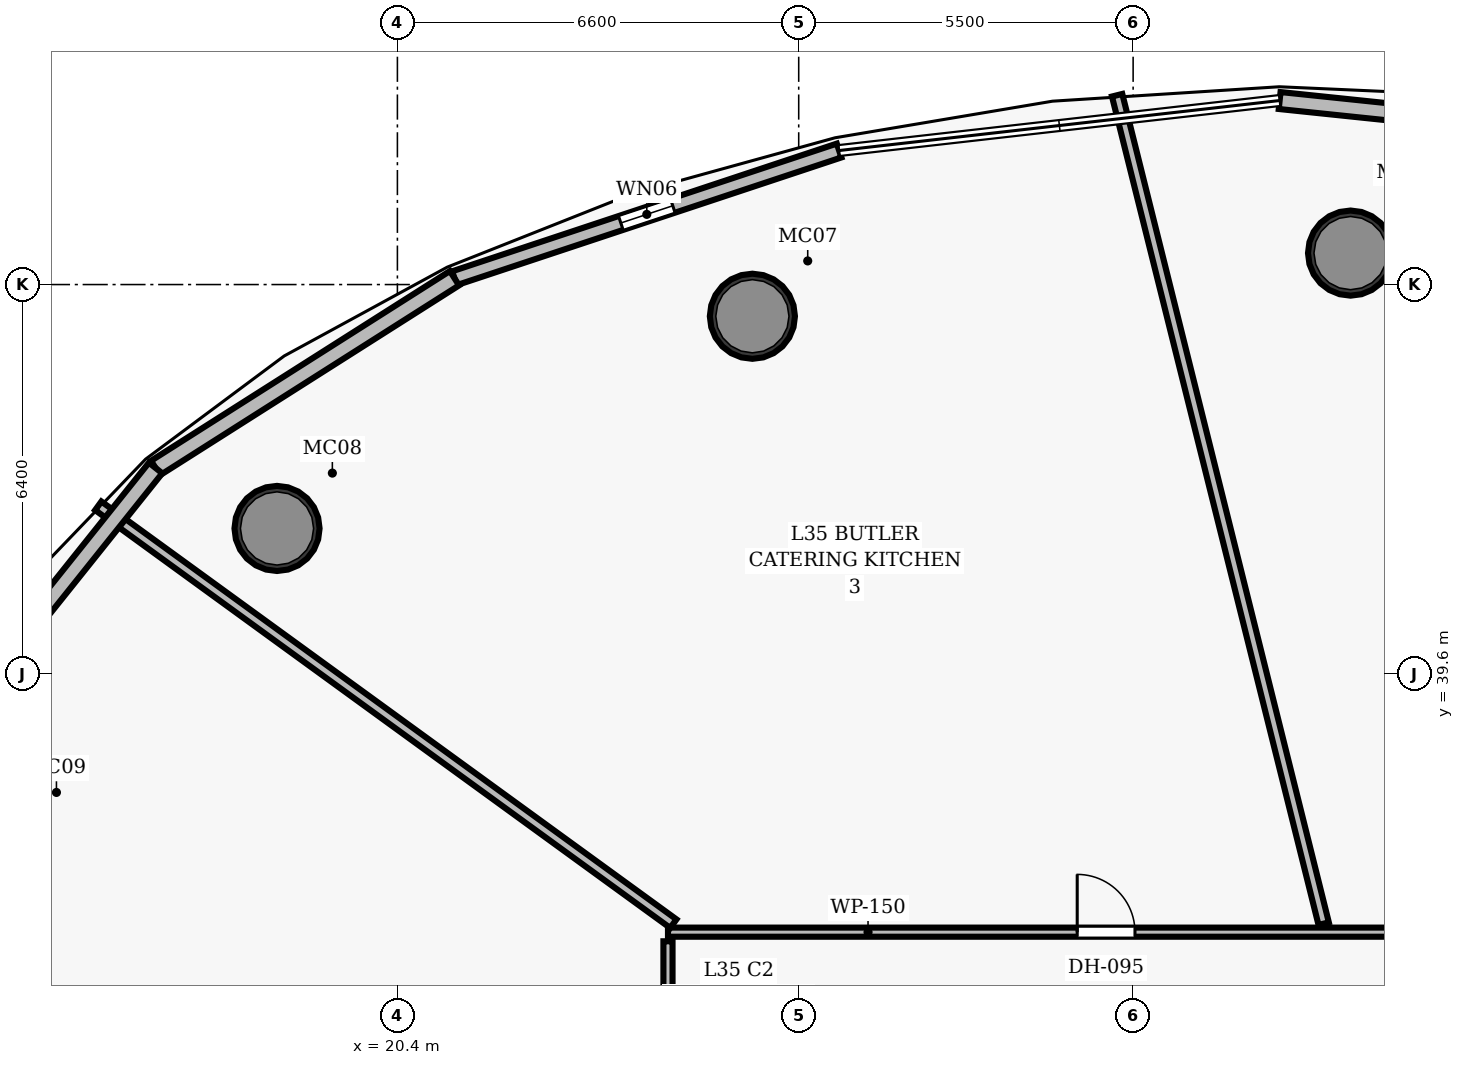
"""IFC4 building model, lengths in metres.
Left out: names, types, materials, properties, quantities, classifications, styles, units other than length and angle.
Written with IfcOpenShell. Run it as: python <this file> out.ifc"""

import sys

from ifc_helpers import new_model, si_unit, direction, frame, frame_2d, origin, origin_2d, place, context, subcontext, project, spatial, rectangle, hollow_circle, extrude, element, fill, save


model = new_model("IFC4")
c1 = context("Model", 3, precision=1e-05, world=origin(), true_north=direction((0.0, 1.0)))
c2 = subcontext(c1, "Body", "Model", "MODEL_VIEW")
j1 = project(units=[si_unit("LENGTHUNIT", "METRE"), si_unit("PLANEANGLEUNIT", "RADIAN")], contexts=[c1])
p1 = place(None, origin())
s1 = spatial("IfcSite", under=j1, at=p1, CompositionType="ELEMENT")
p2 = place(p1, origin())
s2 = spatial("IfcBuilding", under=s1, at=p2, CompositionType="ELEMENT")
p3 = place(p2, frame((0.0, 0.0, 141.3)))
s3 = spatial("IfcBuildingStorey", under=s2, at=p3, CompositionType="ELEMENT", Elevation=141.3)
for number, where, z_axis, x_axis in (
    (1, (36.076, 46.517, 0.0), (0.0, 0.0, 1.0), (1.0, 0.0, 0.0)),
    (2, (26.238, 45.479, 0.0), (0.0, 0.0, 1.0), (1.0, 0.0, 0.0)),
    (3, (18.42, 41.989, 0.0), (0.0, 0.0, 1.0), (1.0, 0.0, 0.0)),
):
    element("IfcColumn", number, at=place(p3, frame(where, z_axis=z_axis, x_axis=x_axis)), inside=s3, PredefinedType="COLUMN", context=c2, shape_type="SweptSolid", body=[
        extrude(hollow_circle(Radius=0.7, WallThickness=0.055, at=origin_2d()), origin(), (0.0, 0.0, 1.0), 3.5),
    ])
p4 = place(p3, frame((24.85, 35.35, 0.0), z_axis=(0.0, 0.0, 1.0), x_axis=(1.0, 0.0, 0.0)))
e4 = element("IfcWall", 4, at=p4, inside=s3, PredefinedType="PARTITIONING", context=c2, shape_type="SweptSolid", body=[
    extrude(rectangle(XDim=26.0, YDim=0.15, at=frame_2d((13.0, 0.0))), origin(), (0.0, 0.0, 1.0), 2.675),
])
p5 = place(p4, frame((18.854, 0.0, 0.0)))
e5 = element("IfcOpeningElement", 5, at=p5, cuts=e4, PredefinedType="OPENING", context=c2, shape_type="SweptSolid", body=[
    extrude(rectangle(XDim=1.5, YDim=2.2, at=frame_2d((0.75, 1.1))), frame((0.0, 0.085, 0.0), z_axis=(0.0, -1.0, 0.0), x_axis=(1.0, 0.0, 0.0)), (0.0, 0.0, 1.0), 0.17),
])
p6 = place(p4, frame((12.393, 0.0, 0.0)))
e6 = element("IfcOpeningElement", 6, at=p6, cuts=e4, PredefinedType="OPENING", context=c2, shape_type="SweptSolid", body=[
    extrude(rectangle(XDim=1.5, YDim=2.2, at=frame_2d((0.75, 1.1))), frame((0.0, 0.085, 0.0), z_axis=(0.0, -1.0, 0.0), x_axis=(1.0, 0.0, 0.0)), (0.0, 0.0, 1.0), 0.17),
])
p7 = place(p4, frame((6.73, 0.0, 0.0)))
e7 = element("IfcOpeningElement", 7, at=p7, cuts=e4, PredefinedType="OPENING", context=c2, shape_type="SweptSolid", body=[
    extrude(rectangle(XDim=0.95, YDim=2.15, at=frame_2d((0.475, 1.075))), frame((0.0, 0.085, 0.0), z_axis=(0.0, -1.0, 0.0), x_axis=(1.0, 0.0, 0.0)), (0.0, 0.0, 1.0), 0.17),
])
p8 = place(p3, frame((24.85, 27.08, 0.0), z_axis=(0.0, 0.0, 1.0), x_axis=(0.0, 1.0, 0.0)))
e8 = element("IfcWall", 8, at=p8, inside=s3, PredefinedType="PARTITIONING", context=c2, shape_type="SweptSolid", body=[
    extrude(rectangle(XDim=8.12, YDim=0.15, at=frame_2d((4.06, 0.0))), origin(), (0.0, 0.0, 1.0), 2.675),
])
p9 = place(p8, frame((3.585, 0.0, 0.0)))
e9 = element("IfcOpeningElement", 9, at=p9, cuts=e8, PredefinedType="OPENING", context=c2, shape_type="SweptSolid", body=[
    extrude(rectangle(XDim=0.95, YDim=2.15, at=frame_2d((0.475, 1.075))), frame((0.0, 0.085, 0.0), z_axis=(0.0, -1.0, 0.0), x_axis=(1.0, 0.0, 0.0)), (0.0, 0.0, 1.0), 0.17),
])
p10 = place(p3, frame((35.634, 35.49, 0.0), z_axis=(0.0, 0.0, 1.0), x_axis=(-0.241917794152, 0.970296748873, 0.0)))
e10 = element("IfcWall", 10, at=p10, inside=s3, PredefinedType="PARTITIONING", context=c2, shape_type="SweptSolid", body=[
    extrude(rectangle(XDim=14.041, YDim=0.175, at=frame_2d((7.021, 0.0))), origin(), (0.0, 0.0, 1.0), 2.675),
])
p11 = place(p3, frame((24.938, 35.49, 0.0), z_axis=(0.0, 0.0, 1.0), x_axis=(-0.80901505235, 0.587787925251, 0.0)))
e11 = element("IfcWall", 11, at=p11, inside=s3, PredefinedType="PARTITIONING", context=c2, shape_type="SweptSolid", body=[
    extrude(rectangle(XDim=11.69, YDim=0.175, at=frame_2d((5.845, 0.0))), origin(), (0.0, 0.0, 1.0), 2.675),
])
p12 = place(p3, frame((34.91, 49.026, 0.0), z_axis=(0.0, 0.0, 1.0), x_axis=(0.994612036357, -0.103667242342, 0.0)))
e12 = element("IfcWall", 12, at=p12, inside=s3, PredefinedType="SOLIDWALL", context=c2, shape_type="SweptSolid", body=[
    extrude(rectangle(XDim=7.569, YDim=0.28, at=frame_2d((3.785, 0.0))), origin(), (0.0, 0.0, 1.0), 3.26),
])
p13 = place(p3, frame((21.339, 46.104, 0.0), z_axis=(0.0, 0.0, 1.0), x_axis=(0.949074506759, 0.315051711024, 0.0)))
e13 = element("IfcWall", 13, at=p13, inside=s3, PredefinedType="SOLIDWALL", context=c2, shape_type="SweptSolid", body=[
    extrude(rectangle(XDim=6.665, YDim=0.24, at=frame_2d((3.333, 0.0))), origin(), (0.0, 0.0, 1.0), 3.26),
])
p14 = place(p13, frame((2.883, 0.0, 0.85)))
e14 = element("IfcOpeningElement", 14, at=p14, cuts=e13, PredefinedType="OPENING", context=c2, shape_type="SweptSolid", body=[
    extrude(rectangle(XDim=0.9, YDim=1.5, at=frame_2d((0.45, 0.75))), frame((0.0, 0.13, 0.0), z_axis=(0.0, -1.0, 0.0), x_axis=(1.0, 0.0, 0.0)), (0.0, 0.0, 1.0), 0.26),
])
p15 = place(p3, frame((16.423, 42.984, 0.0), z_axis=(0.0, 0.0, 1.0), x_axis=(0.844265211989, 0.535925602883, 0.0)))
e15 = element("IfcWall", 15, at=p15, inside=s3, PredefinedType="SOLIDWALL", context=c2, shape_type="SweptSolid", body=[
    extrude(rectangle(XDim=5.823, YDim=0.28, at=frame_2d((2.911, 0.0))), origin(), (0.0, 0.0, 1.0), 3.26),
])
p16 = place(p3, frame((13.193, 38.941, 0.0), z_axis=(0.0, 0.0, 1.0), x_axis=(0.624274915654, 0.781204729687, 0.0)))
e16 = element("IfcWall", 16, at=p16, inside=s3, PredefinedType="SOLIDWALL", context=c2, shape_type="SweptSolid", body=[
    extrude(rectangle(XDim=5.174, YDim=0.28, at=frame_2d((2.587, 0.0))), origin(), (0.0, 0.0, 1.0), 3.26),
])
p17 = place(p7, origin())
e17 = element("IfcDoor", 17, at=p17, inside=s3, OperationType="SINGLE_SWING_LEFT", PredefinedType="DOOR", context=c2, shape_type="SweptSolid", body=[
    extrude(rectangle(XDim=0.95, YDim=2.15, at=frame_2d((0.475, 1.075))), frame((0.0, 0.025, 0.0), z_axis=(0.0, -1.0, 0.0), x_axis=(1.0, 0.0, 0.0)), (0.0, 0.0, 1.0), 0.05),
])
fill(e7, e17)
p18 = place(p14, origin())
e18 = element("IfcWindow", 18, at=p18, inside=s3, PartitioningType="SINGLE_PANEL", PredefinedType="WINDOW", context=c2, shape_type="SweptSolid", body=[
    extrude(rectangle(XDim=0.9, YDim=1.5, at=frame_2d((0.45, 0.75))), frame((0.0, 0.03, 0.0), z_axis=(0.0, -1.0, 0.0), x_axis=(1.0, 0.0, 0.0)), (0.0, 0.0, 1.0), 0.06),
])
fill(e14, e18)
save(model, sys.argv[1])
